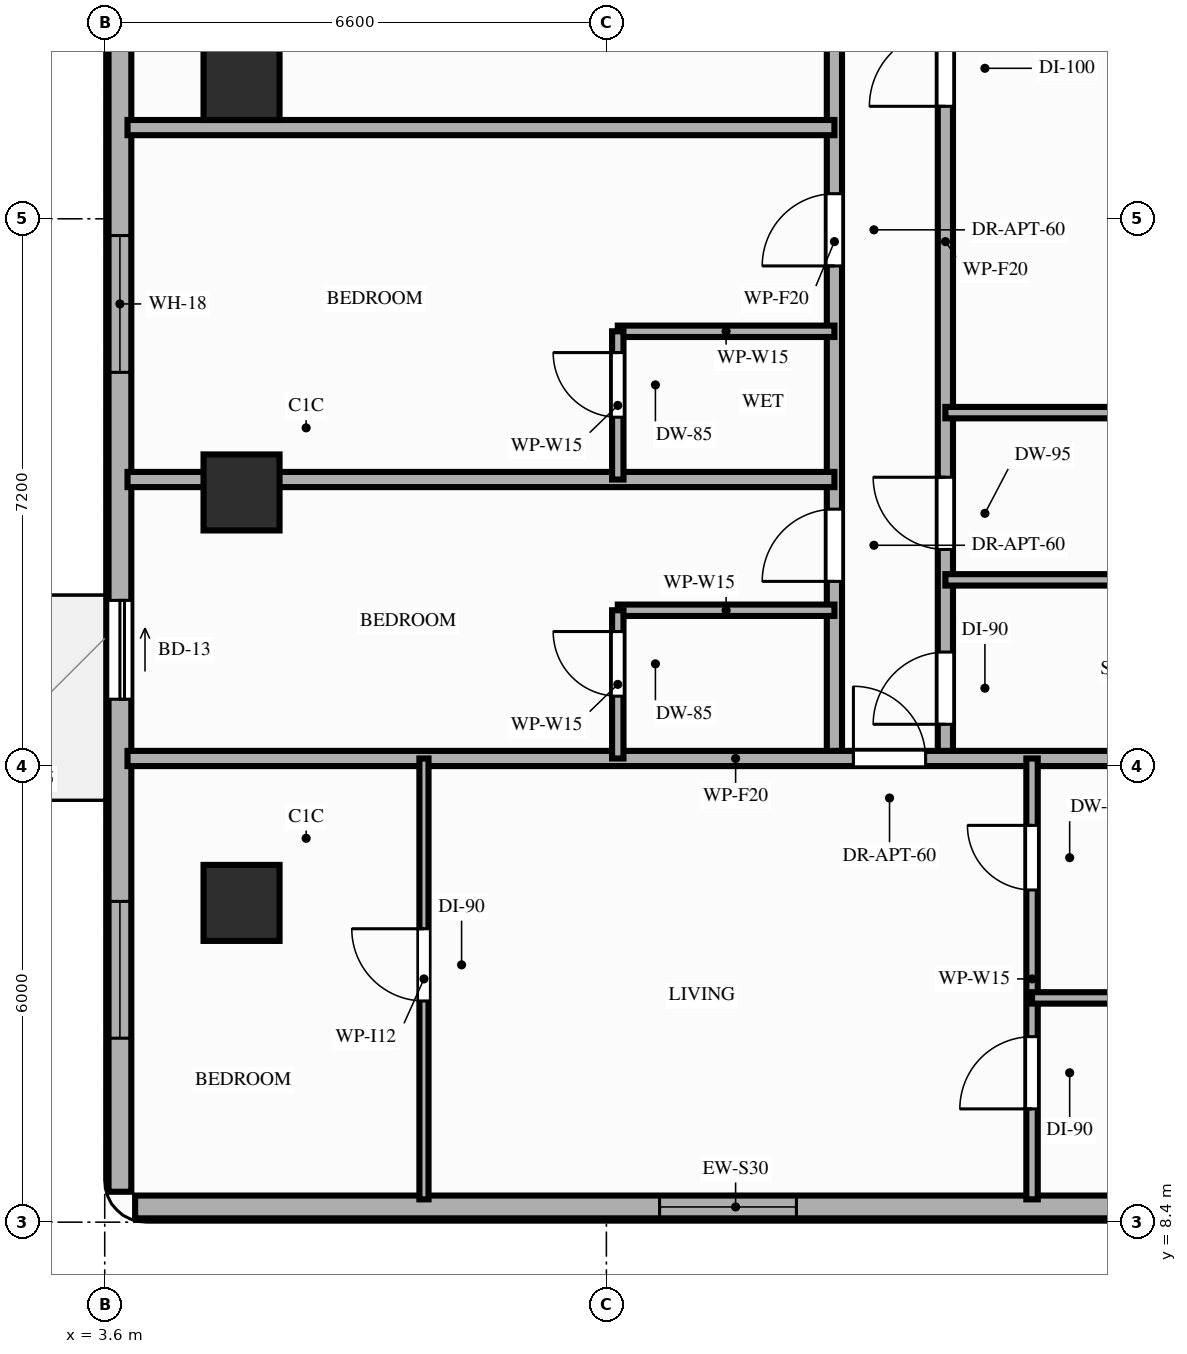
"""IFC4 building model, lengths in metres.
Left out: names, types, materials, properties, quantities, classifications, styles, units other than length and angle.
Written with IfcOpenShell. Run it as: python <this file> out.ifc"""

import sys

from ifc_helpers import new_model, si_unit, direction, frame, frame_2d, origin, origin_2d, place, context, subcontext, project, spatial, rectangle, extrude, element, fill, save


model = new_model("IFC4")
c1 = context("Model", 3, precision=1e-05, world=origin(), true_north=direction((0.0, 1.0)))
c2 = subcontext(c1, "Body", "Model", "MODEL_VIEW")
j1 = project(units=[si_unit("LENGTHUNIT", "METRE"), si_unit("PLANEANGLEUNIT", "RADIAN")], contexts=[c1])
p1 = place(None, origin())
s1 = spatial("IfcSite", under=j1, at=p1, CompositionType="ELEMENT")
p2 = place(p1, origin())
s2 = spatial("IfcBuilding", under=s1, at=p2, CompositionType="ELEMENT")
p3 = place(p2, frame((0.0, 0.0, 136.2)))
s3 = spatial("IfcBuildingStorey", under=s2, at=p3, CompositionType="ELEMENT", Elevation=136.2)
for number, where, z_axis, x_axis in (
    (1, (5.4, 12.6, 0.0), (0.0, 0.0, 1.0), (1.0, 0.0, 0.0)),
    (2, (5.4, 18.0, 0.0), (0.0, 0.0, 1.0), (1.0, 0.0, 0.0)),
    (3, (5.4, 23.4, 0.0), (0.0, 0.0, 1.0), (1.0, 0.0, 0.0)),
):
    element("IfcColumn", number, at=place(p3, frame(where, z_axis=z_axis, x_axis=x_axis)), inside=s3, PredefinedType="COLUMN", context=c2, shape_type="SweptSolid", body=[
        extrude(rectangle(XDim=1.0, YDim=1.0, at=origin_2d()), origin(), (0.0, 0.0, 1.0), 3.2),
    ])
p4 = place(p3, frame((4.0, 8.6, 0.0), z_axis=(0.0, 0.0, 1.0), x_axis=(1.0, 0.0, 0.0)))
e4 = element("IfcWall", 4, at=p4, inside=s3, PredefinedType="STANDARD", context=c2, shape_type="SweptSolid", body=[
    extrude(rectangle(XDim=15.8, YDim=0.3, at=frame_2d((7.9, 0.0))), origin(), (0.0, 0.0, 1.0), 3.02),
])
p5 = place(p4, frame((6.9, 0.0, 0.85)))
e5 = element("IfcOpeningElement", 5, at=p5, cuts=e4, PredefinedType="OPENING", context=c2, shape_type="SweptSolid", body=[
    extrude(rectangle(XDim=1.8, YDim=1.75, at=frame_2d((0.9, 0.875))), frame((0.0, 0.16, 0.0), z_axis=(0.0, -1.0, 0.0), x_axis=(1.0, 0.0, 0.0)), (0.0, 0.0, 1.0), 0.32),
])
p6 = place(p3, frame((3.8, 42.1, 0.0), z_axis=(0.0, 0.0, 1.0), x_axis=(0.0, -1.0, 0.0)))
e6 = element("IfcWall", 6, at=p6, inside=s3, PredefinedType="STANDARD", context=c2, shape_type="SweptSolid", body=[
    extrude(rectangle(XDim=33.3, YDim=0.3, at=frame_2d((16.65, 0.0))), origin(), (0.0, 0.0, 1.0), 2.71),
])
p7 = place(p6, frame((25.52, 0.0, 0.0)))
e7 = element("IfcOpeningElement", 7, at=p7, cuts=e6, PredefinedType="OPENING", context=c2, shape_type="SweptSolid", body=[
    extrude(rectangle(XDim=1.3, YDim=2.08, at=frame_2d((0.65, 1.04))), frame((0.0, 0.16, 0.0), z_axis=(0.0, -1.0, 0.0), x_axis=(1.0, 0.0, 0.0)), (0.0, 0.0, 1.0), 0.32),
])
p8 = place(p6, frame((15.35, 0.0, 0.0)))
e8 = element("IfcOpeningElement", 8, at=p8, cuts=e6, PredefinedType="OPENING", context=c2, shape_type="SweptSolid", body=[
    extrude(rectangle(XDim=1.3, YDim=2.08, at=frame_2d((0.65, 1.04))), frame((0.0, 0.16, 0.0), z_axis=(0.0, -1.0, 0.0), x_axis=(1.0, 0.0, 0.0)), (0.0, 0.0, 1.0), 0.32),
])
p9 = place(p6, frame((20.72, 0.0, 0.85)))
e9 = element("IfcOpeningElement", 9, at=p9, cuts=e6, PredefinedType="OPENING", context=c2, shape_type="SweptSolid", body=[
    extrude(rectangle(XDim=1.8, YDim=1.61, at=frame_2d((0.9, 0.805))), frame((0.0, 0.16, 0.0), z_axis=(0.0, -1.0, 0.0), x_axis=(1.0, 0.0, 0.0)), (0.0, 0.0, 1.0), 0.32),
])
p10 = place(p6, frame((29.48, 0.0, 0.85)))
e10 = element("IfcOpeningElement", 10, at=p10, cuts=e6, PredefinedType="OPENING", context=c2, shape_type="SweptSolid", body=[
    extrude(rectangle(XDim=1.8, YDim=1.61, at=frame_2d((0.9, 0.805))), frame((0.0, 0.16, 0.0), z_axis=(0.0, -1.0, 0.0), x_axis=(1.0, 0.0, 0.0)), (0.0, 0.0, 1.0), 0.32),
])
p11 = place(p6, frame((9.9, 0.0, 0.85)))
e11 = element("IfcOpeningElement", 11, at=p11, cuts=e6, PredefinedType="OPENING", context=c2, shape_type="SweptSolid", body=[
    extrude(rectangle(XDim=1.8, YDim=1.61, at=frame_2d((0.9, 0.805))), frame((0.0, 0.16, 0.0), z_axis=(0.0, -1.0, 0.0), x_axis=(1.0, 0.0, 0.0)), (0.0, 0.0, 1.0), 0.32),
])
p12 = place(p6, frame((3.8, 0.0, 0.85)))
e12 = element("IfcOpeningElement", 12, at=p12, cuts=e6, PredefinedType="OPENING", context=c2, shape_type="SweptSolid", body=[
    extrude(rectangle(XDim=1.8, YDim=1.61, at=frame_2d((0.9, 0.805))), frame((0.0, 0.16, 0.0), z_axis=(0.0, -1.0, 0.0), x_axis=(1.0, 0.0, 0.0)), (0.0, 0.0, 1.0), 0.32),
])
p13 = place(p3, frame((13.2, 14.5, 0.0), z_axis=(0.0, 0.0, 1.0), x_axis=(0.0, 1.0, 0.0)))
e13 = element("IfcWall", 13, at=p13, inside=s3, PredefinedType="PARTITIONING", context=c2, shape_type="SweptSolid", body=[
    extrude(rectangle(XDim=13.6, YDim=0.2, at=frame_2d((6.8, 0.0))), origin(), (0.0, 0.0, 1.0), 2.45),
])
p14 = place(p13, frame((2.33, 0.0, 0.0)))
e14 = element("IfcOpeningElement", 14, at=p14, cuts=e13, PredefinedType="OPENING", context=c2, shape_type="SweptSolid", body=[
    extrude(rectangle(XDim=0.95, YDim=2.15, at=frame_2d((0.475, 1.075))), frame((0.0, 0.11, 0.0), z_axis=(0.0, -1.0, 0.0), x_axis=(1.0, 0.0, 0.0)), (0.0, 0.0, 1.0), 0.22),
])
p15 = place(p13, frame((6.48, 0.0, 0.0)))
e15 = element("IfcOpeningElement", 15, at=p15, cuts=e13, PredefinedType="OPENING", context=c2, shape_type="SweptSolid", body=[
    extrude(rectangle(XDim=0.95, YDim=2.15, at=frame_2d((0.475, 1.075))), frame((0.0, 0.11, 0.0), z_axis=(0.0, -1.0, 0.0), x_axis=(1.0, 0.0, 0.0)), (0.0, 0.0, 1.0), 0.22),
])
p16 = place(p13, frame((10.47, 0.0, 0.0)))
e16 = element("IfcOpeningElement", 16, at=p16, cuts=e13, PredefinedType="OPENING", context=c2, shape_type="SweptSolid", body=[
    extrude(rectangle(XDim=0.95, YDim=2.15, at=frame_2d((0.475, 1.075))), frame((0.0, 0.11, 0.0), z_axis=(0.0, -1.0, 0.0), x_axis=(1.0, 0.0, 0.0)), (0.0, 0.0, 1.0), 0.22),
])
p17 = place(p3, frame((14.66, 14.5, 0.0), z_axis=(0.0, 0.0, 1.0), x_axis=(0.0, 1.0, 0.0)))
e17 = element("IfcWall", 17, at=p17, inside=s3, PredefinedType="PARTITIONING", context=c2, shape_type="SweptSolid", body=[
    extrude(rectangle(XDim=13.6, YDim=0.2, at=frame_2d((6.8, 0.0))), origin(), (0.0, 0.0, 1.0), 2.45),
])
p18 = place(p17, frame((0.45, 0.0, 0.0)))
e18 = element("IfcOpeningElement", 18, at=p18, cuts=e17, PredefinedType="OPENING", context=c2, shape_type="SweptSolid", body=[
    extrude(rectangle(XDim=0.95, YDim=2.15, at=frame_2d((0.475, 1.075))), frame((0.0, 0.11, 0.0), z_axis=(0.0, -1.0, 0.0), x_axis=(1.0, 0.0, 0.0)), (0.0, 0.0, 1.0), 0.22),
])
p19 = place(p17, frame((2.75, 0.0, 0.0)))
e19 = element("IfcOpeningElement", 19, at=p19, cuts=e17, PredefinedType="OPENING", context=c2, shape_type="SweptSolid", body=[
    extrude(rectangle(XDim=0.95, YDim=2.1, at=frame_2d((0.475, 1.05))), frame((0.0, 0.11, 0.0), z_axis=(0.0, -1.0, 0.0), x_axis=(1.0, 0.0, 0.0)), (0.0, 0.0, 1.0), 0.22),
])
p20 = place(p17, frame((8.58, 0.0, 0.0)))
e20 = element("IfcOpeningElement", 20, at=p20, cuts=e17, PredefinedType="OPENING", context=c2, shape_type="SweptSolid", body=[
    extrude(rectangle(XDim=1.0, YDim=2.15, at=frame_2d((0.5, 1.075))), frame((0.0, 0.11, 0.0), z_axis=(0.0, -1.0, 0.0), x_axis=(1.0, 0.0, 0.0)), (0.0, 0.0, 1.0), 0.22),
])
p21 = place(p3, frame((3.9, 14.5, 0.0), z_axis=(0.0, 0.0, 1.0), x_axis=(1.0, 0.0, 0.0)))
e21 = element("IfcWall", 21, at=p21, inside=s3, PredefinedType="PARTITIONING", context=c2, shape_type="SweptSolid", body=[
    extrude(rectangle(XDim=16.0, YDim=0.2, at=frame_2d((8.0, 0.0))), origin(), (0.0, 0.0, 1.0), 2.45),
])
p22 = place(p21, frame((9.55, 0.0, 0.0)))
e22 = element("IfcOpeningElement", 22, at=p22, cuts=e21, PredefinedType="OPENING", context=c2, shape_type="SweptSolid", body=[
    extrude(rectangle(XDim=0.95, YDim=2.15, at=frame_2d((0.475, 1.075))), frame((0.0, 0.11, 0.0), z_axis=(0.0, -1.0, 0.0), x_axis=(1.0, 0.0, 0.0)), (0.0, 0.0, 1.0), 0.22),
])
p23 = place(p3, frame((10.35, 16.45, 0.0), z_axis=(0.0, 0.0, 1.0), x_axis=(1.0, 0.0, 0.0)))
e23 = element("IfcWall", 23, at=p23, inside=s3, PredefinedType="PARTITIONING", context=c2, shape_type="SweptSolid", body=[
    extrude(rectangle(XDim=2.85, YDim=0.15, at=frame_2d((1.425, 0.0))), origin(), (0.0, 0.0, 1.0), 2.61),
])
p24 = place(p3, frame((10.35, 14.5, 0.0), z_axis=(0.0, 0.0, 1.0), x_axis=(0.0, 1.0, 0.0)))
e24 = element("IfcWall", 24, at=p24, inside=s3, PredefinedType="PARTITIONING", context=c2, shape_type="SweptSolid", body=[
    extrude(rectangle(XDim=1.95, YDim=0.15, at=frame_2d((0.975, 0.0))), origin(), (0.0, 0.0, 1.0), 2.61),
])
p25 = place(p24, frame((0.82, 0.0, 0.0)))
e25 = element("IfcOpeningElement", 25, at=p25, cuts=e24, PredefinedType="OPENING", context=c2, shape_type="SweptSolid", body=[
    extrude(rectangle(XDim=0.85, YDim=2.1, at=frame_2d((0.425, 1.05))), frame((0.0, 0.085, 0.0), z_axis=(0.0, -1.0, 0.0), x_axis=(1.0, 0.0, 0.0)), (0.0, 0.0, 1.0), 0.17),
])
p26 = place(p3, frame((3.9, 18.17, 0.0), z_axis=(0.0, 0.0, 1.0), x_axis=(1.0, 0.0, 0.0)))
e26 = element("IfcWall", 26, at=p26, inside=s3, PredefinedType="PARTITIONING", context=c2, shape_type="SweptSolid", body=[
    extrude(rectangle(XDim=9.3, YDim=0.2, at=frame_2d((4.65, 0.0))), origin(), (0.0, 0.0, 1.0), 2.45),
])
p27 = place(p3, frame((10.35, 20.12, 0.0), z_axis=(0.0, 0.0, 1.0), x_axis=(1.0, 0.0, 0.0)))
e27 = element("IfcWall", 27, at=p27, inside=s3, PredefinedType="PARTITIONING", context=c2, shape_type="SweptSolid", body=[
    extrude(rectangle(XDim=2.85, YDim=0.15, at=frame_2d((1.425, 0.0))), origin(), (0.0, 0.0, 1.0), 3.02),
])
p28 = place(p3, frame((10.35, 18.17, 0.0), z_axis=(0.0, 0.0, 1.0), x_axis=(0.0, 1.0, 0.0)))
e28 = element("IfcWall", 28, at=p28, inside=s3, PredefinedType="PARTITIONING", context=c2, shape_type="SweptSolid", body=[
    extrude(rectangle(XDim=1.95, YDim=0.15, at=frame_2d((0.975, 0.0))), origin(), (0.0, 0.0, 1.0), 2.45),
])
p29 = place(p28, frame((0.82, 0.0, 0.0)))
e29 = element("IfcOpeningElement", 29, at=p29, cuts=e28, PredefinedType="OPENING", context=c2, shape_type="SweptSolid", body=[
    extrude(rectangle(XDim=0.85, YDim=2.1, at=frame_2d((0.425, 1.05))), frame((0.0, 0.085, 0.0), z_axis=(0.0, -1.0, 0.0), x_axis=(1.0, 0.0, 0.0)), (0.0, 0.0, 1.0), 0.17),
])
p30 = place(p3, frame((3.9, 22.8, 0.0), z_axis=(0.0, 0.0, 1.0), x_axis=(1.0, 0.0, 0.0)))
e30 = element("IfcWall", 30, at=p30, inside=s3, PredefinedType="PARTITIONING", context=c2, shape_type="SweptSolid", body=[
    extrude(rectangle(XDim=9.3, YDim=0.2, at=frame_2d((4.65, 0.0))), origin(), (0.0, 0.0, 1.0), 2.45),
])
p31 = place(p3, frame((7.8, 8.7, 0.0), z_axis=(0.0, 0.0, 1.0), x_axis=(0.0, 1.0, 0.0)))
e31 = element("IfcWall", 31, at=p31, inside=s3, PredefinedType="PARTITIONING", context=c2, shape_type="SweptSolid", body=[
    extrude(rectangle(XDim=5.8, YDim=0.12, at=frame_2d((2.9, 0.0))), origin(), (0.0, 0.0, 1.0), 2.45),
])
p32 = place(p31, frame((2.61, 0.0, 0.0)))
e32 = element("IfcOpeningElement", 32, at=p32, cuts=e31, PredefinedType="OPENING", context=c2, shape_type="SweptSolid", body=[
    extrude(rectangle(XDim=0.95, YDim=2.15, at=frame_2d((0.475, 1.075))), frame((0.0, 0.07, 0.0), z_axis=(0.0, -1.0, 0.0), x_axis=(1.0, 0.0, 0.0)), (0.0, 0.0, 1.0), 0.14),
])
p33 = place(p3, frame((15.8, 8.7, 0.0), z_axis=(0.0, 0.0, 1.0), x_axis=(0.0, 1.0, 0.0)))
e33 = element("IfcWall", 33, at=p33, inside=s3, PredefinedType="PARTITIONING", context=c2, shape_type="SweptSolid", body=[
    extrude(rectangle(XDim=5.8, YDim=0.15, at=frame_2d((2.9, 0.0))), origin(), (0.0, 0.0, 1.0), 2.45),
])
p34 = place(p33, frame((1.19, 0.0, 0.0)))
e34 = element("IfcOpeningElement", 34, at=p34, cuts=e33, PredefinedType="OPENING", context=c2, shape_type="SweptSolid", body=[
    extrude(rectangle(XDim=0.95, YDim=2.15, at=frame_2d((0.475, 1.075))), frame((0.0, 0.085, 0.0), z_axis=(0.0, -1.0, 0.0), x_axis=(1.0, 0.0, 0.0)), (0.0, 0.0, 1.0), 0.17),
])
p35 = place(p33, frame((4.07, 0.0, 0.0)))
e35 = element("IfcOpeningElement", 35, at=p35, cuts=e33, PredefinedType="OPENING", context=c2, shape_type="SweptSolid", body=[
    extrude(rectangle(XDim=0.85, YDim=2.1, at=frame_2d((0.425, 1.05))), frame((0.0, 0.085, 0.0), z_axis=(0.0, -1.0, 0.0), x_axis=(1.0, 0.0, 0.0)), (0.0, 0.0, 1.0), 0.17),
])
p36 = place(p3, frame((15.8, 11.35, 0.0), z_axis=(0.0, 0.0, 1.0), x_axis=(1.0, 0.0, 0.0)))
e36 = element("IfcWall", 36, at=p36, inside=s3, PredefinedType="PARTITIONING", context=c2, shape_type="SweptSolid", body=[
    extrude(rectangle(XDim=4.1, YDim=0.15, at=frame_2d((2.05, 0.0))), origin(), (0.0, 0.0, 1.0), 3.02),
])
for number, where, z_axis, x_axis in (
    (37, (14.66, 16.85, 0.0), (0.0, 0.0, 1.0), (1.0, 0.0, 0.0)),
    (38, (14.66, 19.05, 0.0), (0.0, 0.0, 1.0), (1.0, 0.0, 0.0)),
):
    element("IfcWall", number, at=place(p3, frame(where, z_axis=z_axis, x_axis=x_axis)), inside=s3, PredefinedType="PARTITIONING", context=c2, shape_type="SweptSolid", body=[
        extrude(rectangle(XDim=5.24, YDim=0.15, at=frame_2d((2.62, 0.0))), origin(), (0.0, 0.0, 1.0), 2.45),
    ])
p37 = place(p7, origin())
e39 = element("IfcDoor", 39, at=p37, inside=s3, OperationType="SLIDING_TO_LEFT", PredefinedType="DOOR", context=c2, shape_type="SweptSolid", body=[
    extrude(rectangle(XDim=1.3, YDim=2.08, at=frame_2d((0.65, 1.04))), frame((0.0, 0.025, 0.0), z_axis=(0.0, -1.0, 0.0), x_axis=(1.0, 0.0, 0.0)), (0.0, 0.0, 1.0), 0.05),
])
fill(e7, e39)
p38 = place(p9, origin())
e40 = element("IfcWindow", 40, at=p38, inside=s3, PartitioningType="SINGLE_PANEL", PredefinedType="WINDOW", context=c2, shape_type="SweptSolid", body=[
    extrude(rectangle(XDim=1.8, YDim=1.61, at=frame_2d((0.9, 0.805))), frame((0.0, 0.03, 0.0), z_axis=(0.0, -1.0, 0.0), x_axis=(1.0, 0.0, 0.0)), (0.0, 0.0, 1.0), 0.06),
])
fill(e9, e40)
p39 = place(p10, origin())
e41 = element("IfcWindow", 41, at=p39, inside=s3, PartitioningType="SINGLE_PANEL", PredefinedType="WINDOW", context=c2, shape_type="SweptSolid", body=[
    extrude(rectangle(XDim=1.8, YDim=1.61, at=frame_2d((0.9, 0.805))), frame((0.0, 0.03, 0.0), z_axis=(0.0, -1.0, 0.0), x_axis=(1.0, 0.0, 0.0)), (0.0, 0.0, 1.0), 0.06),
])
fill(e10, e41)
p40 = place(p5, origin())
e42 = element("IfcWindow", 42, at=p40, inside=s3, PartitioningType="SINGLE_PANEL", PredefinedType="WINDOW", context=c2, shape_type="SweptSolid", body=[
    extrude(rectangle(XDim=1.8, YDim=1.75, at=frame_2d((0.9, 0.875))), frame((0.0, 0.03, 0.0), z_axis=(0.0, -1.0, 0.0), x_axis=(1.0, 0.0, 0.0)), (0.0, 0.0, 1.0), 0.06),
])
fill(e5, e42)
p41 = place(p25, origin())
e43 = element("IfcDoor", 43, at=p41, inside=s3, OperationType="SINGLE_SWING_RIGHT", PredefinedType="DOOR", context=c2, shape_type="SweptSolid", body=[
    extrude(rectangle(XDim=0.85, YDim=2.1, at=frame_2d((0.425, 1.05))), frame((0.0, 0.025, 0.0), z_axis=(0.0, -1.0, 0.0), x_axis=(1.0, 0.0, 0.0)), (0.0, 0.0, 1.0), 0.05),
])
fill(e25, e43)
p42 = place(p14, origin())
e44 = element("IfcDoor", 44, at=p42, inside=s3, OperationType="SINGLE_SWING_LEFT", PredefinedType="DOOR", context=c2, shape_type="SweptSolid", body=[
    extrude(rectangle(XDim=0.95, YDim=2.15, at=frame_2d((0.475, 1.075))), frame((0.0, 0.025, 0.0), z_axis=(0.0, -1.0, 0.0), x_axis=(1.0, 0.0, 0.0)), (0.0, 0.0, 1.0), 0.05),
])
fill(e14, e44)
p43 = place(p29, origin())
e45 = element("IfcDoor", 45, at=p43, inside=s3, OperationType="SINGLE_SWING_RIGHT", PredefinedType="DOOR", context=c2, shape_type="SweptSolid", body=[
    extrude(rectangle(XDim=0.85, YDim=2.1, at=frame_2d((0.425, 1.05))), frame((0.0, 0.025, 0.0), z_axis=(0.0, -1.0, 0.0), x_axis=(1.0, 0.0, 0.0)), (0.0, 0.0, 1.0), 0.05),
])
fill(e29, e45)
p44 = place(p15, origin())
e46 = element("IfcDoor", 46, at=p44, inside=s3, OperationType="SINGLE_SWING_LEFT", PredefinedType="DOOR", context=c2, shape_type="SweptSolid", body=[
    extrude(rectangle(XDim=0.95, YDim=2.15, at=frame_2d((0.475, 1.075))), frame((0.0, 0.025, 0.0), z_axis=(0.0, -1.0, 0.0), x_axis=(1.0, 0.0, 0.0)), (0.0, 0.0, 1.0), 0.05),
])
fill(e15, e46)
p45 = place(p22, origin())
e47 = element("IfcDoor", 47, at=p45, inside=s3, OperationType="SINGLE_SWING_LEFT", PredefinedType="DOOR", context=c2, shape_type="SweptSolid", body=[
    extrude(rectangle(XDim=0.95, YDim=2.15, at=frame_2d((0.475, 1.075))), frame((0.0, 0.025, 0.0), z_axis=(0.0, -1.0, 0.0), x_axis=(1.0, 0.0, 0.0)), (0.0, 0.0, 1.0), 0.05),
])
fill(e22, e47)
p46 = place(p32, origin())
e48 = element("IfcDoor", 48, at=p46, inside=s3, OperationType="SINGLE_SWING_RIGHT", PredefinedType="DOOR", context=c2, shape_type="SweptSolid", body=[
    extrude(rectangle(XDim=0.95, YDim=2.15, at=frame_2d((0.475, 1.075))), frame((0.0, 0.025, 0.0), z_axis=(0.0, -1.0, 0.0), x_axis=(1.0, 0.0, 0.0)), (0.0, 0.0, 1.0), 0.05),
])
fill(e32, e48)
p47 = place(p34, origin())
e49 = element("IfcDoor", 49, at=p47, inside=s3, OperationType="SINGLE_SWING_LEFT", PredefinedType="DOOR", context=c2, shape_type="SweptSolid", body=[
    extrude(rectangle(XDim=0.95, YDim=2.15, at=frame_2d((0.475, 1.075))), frame((0.0, 0.025, 0.0), z_axis=(0.0, -1.0, 0.0), x_axis=(1.0, 0.0, 0.0)), (0.0, 0.0, 1.0), 0.05),
])
fill(e34, e49)
p48 = place(p35, origin())
e50 = element("IfcDoor", 50, at=p48, inside=s3, OperationType="SINGLE_SWING_RIGHT", PredefinedType="DOOR", context=c2, shape_type="SweptSolid", body=[
    extrude(rectangle(XDim=0.85, YDim=2.1, at=frame_2d((0.425, 1.05))), frame((0.0, 0.025, 0.0), z_axis=(0.0, -1.0, 0.0), x_axis=(1.0, 0.0, 0.0)), (0.0, 0.0, 1.0), 0.05),
])
fill(e35, e50)
p49 = place(p18, origin())
e51 = element("IfcDoor", 51, at=p49, inside=s3, OperationType="SINGLE_SWING_LEFT", PredefinedType="DOOR", context=c2, shape_type="SweptSolid", body=[
    extrude(rectangle(XDim=0.95, YDim=2.15, at=frame_2d((0.475, 1.075))), frame((0.0, 0.025, 0.0), z_axis=(0.0, -1.0, 0.0), x_axis=(1.0, 0.0, 0.0)), (0.0, 0.0, 1.0), 0.05),
])
fill(e18, e51)
p50 = place(p19, origin())
e52 = element("IfcDoor", 52, at=p50, inside=s3, OperationType="SINGLE_SWING_RIGHT", PredefinedType="DOOR", context=c2, shape_type="SweptSolid", body=[
    extrude(rectangle(XDim=0.95, YDim=2.1, at=frame_2d((0.475, 1.05))), frame((0.0, 0.025, 0.0), z_axis=(0.0, -1.0, 0.0), x_axis=(1.0, 0.0, 0.0)), (0.0, 0.0, 1.0), 0.05),
])
fill(e19, e52)
p51 = place(p20, origin())
e53 = element("IfcDoor", 53, at=p51, inside=s3, OperationType="SINGLE_SWING_LEFT", PredefinedType="DOOR", context=c2, shape_type="SweptSolid", body=[
    extrude(rectangle(XDim=1.0, YDim=2.15, at=frame_2d((0.5, 1.075))), frame((0.0, 0.025, 0.0), z_axis=(0.0, -1.0, 0.0), x_axis=(1.0, 0.0, 0.0)), (0.0, 0.0, 1.0), 0.05),
])
fill(e20, e53)
save(model, sys.argv[1])
